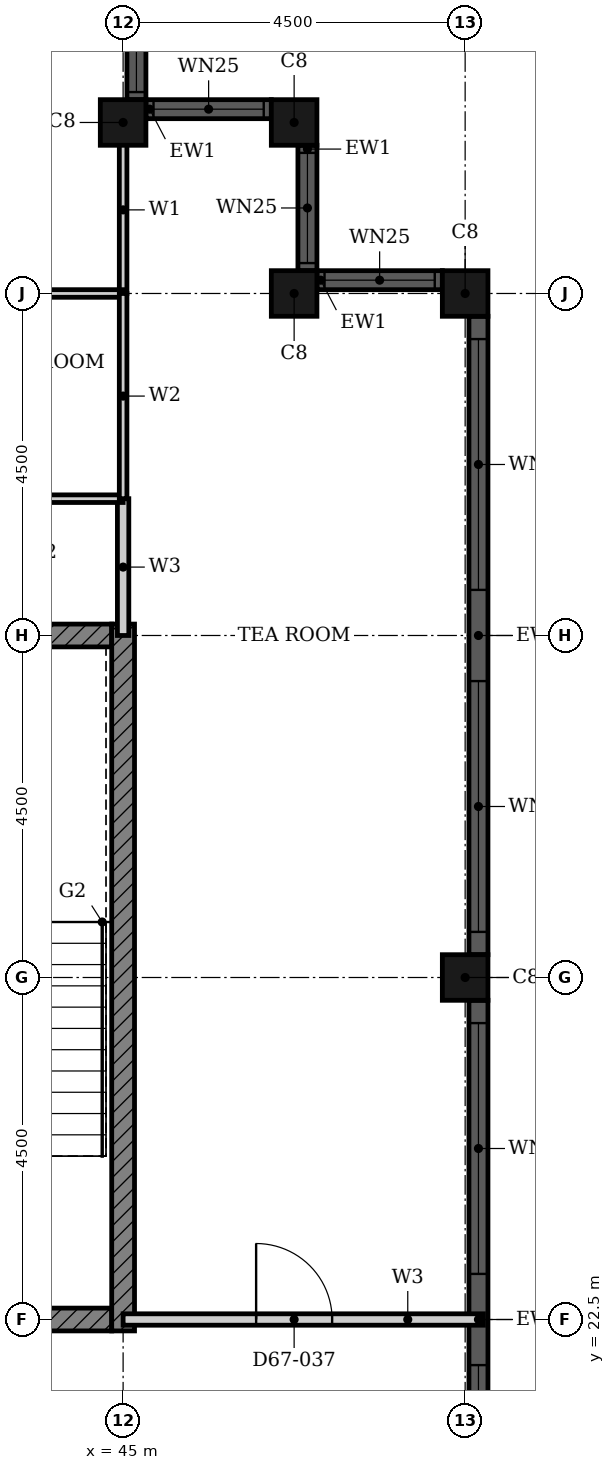
"""IFC4 building model, lengths in metres.
Left out: names, types, materials, properties, quantities, classifications, styles, units other than length and angle.
Written with IfcOpenShell. Run it as: python <this file> out.ifc"""

import sys

from ifc_helpers import new_model, si_unit, direction, frame, frame_2d, origin, origin_2d, place, context, subcontext, project, spatial, rectangle, hollow_rectangle, extrude, element, fill, save


model = new_model("IFC4")
c1 = context("Model", 3, precision=1e-05, world=origin(), true_north=direction((0.0, 1.0)))
c2 = subcontext(c1, "Body", "Model", "MODEL_VIEW")
j1 = project(units=[si_unit("LENGTHUNIT", "METRE"), si_unit("PLANEANGLEUNIT", "RADIAN")], contexts=[c1])
p1 = place(None, origin())
s1 = spatial("IfcSite", under=j1, at=p1, CompositionType="ELEMENT")
p2 = place(p1, origin())
s2 = spatial("IfcBuilding", under=s1, at=p2, CompositionType="ELEMENT")
p3 = place(p2, frame((0.0, 0.0, 263.8)))
s3 = spatial("IfcBuildingStorey", under=s2, at=p3, CompositionType="ELEMENT", Elevation=263.8)
for number, where, z_axis, x_axis in (
    (1, (49.5, 27.0, 0.0), (0.0, 0.0, 1.0), (1.0, 0.0, 0.0)),
    (2, (49.5, 36.0, 0.0), (0.0, 0.0, 1.0), (1.0, 0.0, 0.0)),
    (3, (47.25, 36.0, 0.0), (0.0, 0.0, 1.0), (1.0, 0.0, 0.0)),
    (4, (47.25, 38.25, 0.0), (0.0, 0.0, 1.0), (1.0, 0.0, 0.0)),
    (5, (45.0, 38.25, 0.0), (0.0, 0.0, 1.0), (1.0, 0.0, 0.0)),
):
    element("IfcColumn", number, at=place(p3, frame(where, z_axis=z_axis, x_axis=x_axis)), inside=s3, PredefinedType="COLUMN", context=c2, shape_type="SweptSolid", body=[
        extrude(hollow_rectangle(XDim=0.6, YDim=0.6, WallThickness=0.02, at=origin_2d()), origin(), (0.0, 0.0, 1.0), 3.7),
    ])
p4 = place(p3, frame((49.675, 18.3, 0.0), z_axis=(0.0, 0.0, 1.0), x_axis=(0.0, 1.0, 0.0)))
e6 = element("IfcWall", 6, at=p4, inside=s3, PredefinedType="SOLIDWALL", context=c2, shape_type="SweptSolid", body=[
    extrude(rectangle(XDim=8.4, YDim=0.25, at=frame_2d((4.2, 0.0))), origin(), (0.0, 0.0, 1.0), 3.7),
])
p5 = place(p4, frame((0.3, 0.0, 0.45)))
e7 = element("IfcOpeningElement", 7, at=p5, cuts=e6, PredefinedType="OPENING", context=c2, shape_type="SweptSolid", body=[
    extrude(rectangle(XDim=3.3, YDim=2.3, at=frame_2d((1.65, 1.15))), frame((0.0, 0.135, 0.0), z_axis=(0.0, -1.0, 0.0), x_axis=(1.0, 0.0, 0.0)), (0.0, 0.0, 1.0), 0.27),
])
p6 = place(p4, frame((4.8, 0.0, 0.45)))
e8 = element("IfcOpeningElement", 8, at=p6, cuts=e6, PredefinedType="OPENING", context=c2, shape_type="SweptSolid", body=[
    extrude(rectangle(XDim=3.3, YDim=2.3, at=frame_2d((1.65, 1.15))), frame((0.0, 0.135, 0.0), z_axis=(0.0, -1.0, 0.0), x_axis=(1.0, 0.0, 0.0)), (0.0, 0.0, 1.0), 0.27),
])
p7 = place(p3, frame((49.675, 27.3, 0.0), z_axis=(0.0, 0.0, 1.0), x_axis=(0.0, 1.0, 0.0)))
e9 = element("IfcWall", 9, at=p7, inside=s3, PredefinedType="SOLIDWALL", context=c2, shape_type="SweptSolid", body=[
    extrude(rectangle(XDim=8.4, YDim=0.25, at=frame_2d((4.2, 0.0))), origin(), (0.0, 0.0, 1.0), 3.7),
])
p8 = place(p7, frame((0.3, 0.0, 0.45)))
e10 = element("IfcOpeningElement", 10, at=p8, cuts=e9, PredefinedType="OPENING", context=c2, shape_type="SweptSolid", body=[
    extrude(rectangle(XDim=3.3, YDim=2.3, at=frame_2d((1.65, 1.15))), frame((0.0, 0.135, 0.0), z_axis=(0.0, -1.0, 0.0), x_axis=(1.0, 0.0, 0.0)), (0.0, 0.0, 1.0), 0.27),
])
p9 = place(p7, frame((4.8, 0.0, 0.45)))
e11 = element("IfcOpeningElement", 11, at=p9, cuts=e9, PredefinedType="OPENING", context=c2, shape_type="SweptSolid", body=[
    extrude(rectangle(XDim=3.3, YDim=2.3, at=frame_2d((1.65, 1.15))), frame((0.0, 0.135, 0.0), z_axis=(0.0, -1.0, 0.0), x_axis=(1.0, 0.0, 0.0)), (0.0, 0.0, 1.0), 0.27),
])
p10 = place(p3, frame((49.2, 36.175, 0.0), z_axis=(0.0, 0.0, 1.0), x_axis=(-1.0, 0.0, 0.0)))
e12 = element("IfcWall", 12, at=p10, inside=s3, PredefinedType="SOLIDWALL", context=c2, shape_type="SweptSolid", body=[
    extrude(rectangle(XDim=1.65, YDim=0.25, at=frame_2d((0.825, 0.0))), origin(), (0.0, 0.0, 1.0), 3.7),
])
p11 = place(p10, frame((0.1, 0.0, 0.9)))
e13 = element("IfcOpeningElement", 13, at=p11, cuts=e12, PredefinedType="OPENING", context=c2, shape_type="SweptSolid", body=[
    extrude(rectangle(XDim=1.45, YDim=1.85, at=frame_2d((0.725, 0.925))), frame((0.0, 0.135, 0.0), z_axis=(0.0, -1.0, 0.0), x_axis=(1.0, 0.0, 0.0)), (0.0, 0.0, 1.0), 0.27),
])
p12 = place(p3, frame((47.425, 36.3, 0.0), z_axis=(0.0, 0.0, 1.0), x_axis=(0.0, 1.0, 0.0)))
e14 = element("IfcWall", 14, at=p12, inside=s3, PredefinedType="SOLIDWALL", context=c2, shape_type="SweptSolid", body=[
    extrude(rectangle(XDim=1.65, YDim=0.25, at=frame_2d((0.825, 0.0))), origin(), (0.0, 0.0, 1.0), 3.7),
])
p13 = place(p12, frame((0.1, 0.0, 0.9)))
e15 = element("IfcOpeningElement", 15, at=p13, cuts=e14, PredefinedType="OPENING", context=c2, shape_type="SweptSolid", body=[
    extrude(rectangle(XDim=1.45, YDim=1.85, at=frame_2d((0.725, 0.925))), frame((0.0, 0.135, 0.0), z_axis=(0.0, -1.0, 0.0), x_axis=(1.0, 0.0, 0.0)), (0.0, 0.0, 1.0), 0.27),
])
p14 = place(p3, frame((46.95, 38.425, 0.0), z_axis=(0.0, 0.0, 1.0), x_axis=(-1.0, 0.0, 0.0)))
e16 = element("IfcWall", 16, at=p14, inside=s3, PredefinedType="SOLIDWALL", context=c2, shape_type="SweptSolid", body=[
    extrude(rectangle(XDim=1.65, YDim=0.25, at=frame_2d((0.825, 0.0))), origin(), (0.0, 0.0, 1.0), 3.7),
])
p15 = place(p14, frame((0.1, 0.0, 0.9)))
e17 = element("IfcOpeningElement", 17, at=p15, cuts=e16, PredefinedType="OPENING", context=c2, shape_type="SweptSolid", body=[
    extrude(rectangle(XDim=1.45, YDim=1.85, at=frame_2d((0.725, 0.925))), frame((0.0, 0.135, 0.0), z_axis=(0.0, -1.0, 0.0), x_axis=(1.0, 0.0, 0.0)), (0.0, 0.0, 1.0), 0.27),
])
p16 = place(p3, frame((45.175, 38.55, 0.0), z_axis=(0.0, 0.0, 1.0), x_axis=(0.0, 1.0, 0.0)))
e18 = element("IfcWall", 18, at=p16, inside=s3, PredefinedType="SOLIDWALL", context=c2, shape_type="SweptSolid", body=[
    extrude(rectangle(XDim=1.65, YDim=0.25, at=frame_2d((0.825, 0.0))), origin(), (0.0, 0.0, 1.0), 3.7),
])
p17 = place(p16, frame((0.1, 0.0, 0.9)))
e19 = element("IfcOpeningElement", 19, at=p17, cuts=e18, PredefinedType="OPENING", context=c2, shape_type="SweptSolid", body=[
    extrude(rectangle(XDim=1.45, YDim=1.85, at=frame_2d((0.725, 0.925))), frame((0.0, 0.135, 0.0), z_axis=(0.0, -1.0, 0.0), x_axis=(1.0, 0.0, 0.0)), (0.0, 0.0, 1.0), 0.27),
])
p18 = place(p3, frame((30.339, 22.5, 0.0), z_axis=(0.0, 0.0, 1.0), x_axis=(1.0, 0.0, 0.0)))
e20 = element("IfcWall", 20, at=p18, inside=s3, PredefinedType="SHEAR", context=c2, shape_type="SweptSolid", body=[
    extrude(rectangle(XDim=14.511, YDim=0.3, at=frame_2d((7.255, 0.0))), origin(), (0.0, 0.0, 1.0), 3.4),
])
p19 = place(p18, frame((7.975, 0.0, 0.0)))
e21 = element("IfcOpeningElement", 21, at=p19, cuts=e20, PredefinedType="OPENING", context=c2, shape_type="SweptSolid", body=[
    extrude(rectangle(XDim=1.8, YDim=2.1, at=frame_2d((0.9, 1.05))), frame((0.0, 0.16, 0.0), z_axis=(0.0, -1.0, 0.0), x_axis=(1.0, 0.0, 0.0)), (0.0, 0.0, 1.0), 0.32),
])
p20 = place(p3, frame((40.625, 31.5, 0.0), z_axis=(0.0, 0.0, 1.0), x_axis=(1.0, 0.0, 0.0)))
e22 = element("IfcWall", 22, at=p20, inside=s3, PredefinedType="SHEAR", context=c2, shape_type="SweptSolid", body=[
    extrude(rectangle(XDim=4.225, YDim=0.3, at=frame_2d((2.113, 0.0))), origin(), (0.0, 0.0, 1.0), 3.4),
])
p21 = place(p3, frame((45.0, 22.35, 0.0), z_axis=(0.0, 0.0, 1.0), x_axis=(0.0, 1.0, 0.0)))
e23 = element("IfcWall", 23, at=p21, inside=s3, PredefinedType="SHEAR", context=c2, shape_type="SweptSolid", body=[
    extrude(rectangle(XDim=9.3, YDim=0.3, at=frame_2d((4.65, 0.0))), origin(), (0.0, 0.0, 1.0), 3.4),
])
p22 = place(p3, frame((45.0, 22.5, 0.0), z_axis=(0.0, 0.0, 1.0), x_axis=(1.0, 0.0, 0.0)))
e24 = element("IfcWall", 24, at=p22, inside=s3, PredefinedType="PARTITIONING", context=c2, shape_type="SweptSolid", body=[
    extrude(rectangle(XDim=4.74, YDim=0.15, at=frame_2d((2.37, 0.0))), origin(), (0.0, 0.0, 1.0), 3.4),
])
p23 = place(p22, frame((1.75, 0.0, 0.0)))
e25 = element("IfcOpeningElement", 25, at=p23, cuts=e24, PredefinedType="OPENING", context=c2, shape_type="SweptSolid", body=[
    extrude(rectangle(XDim=1.0, YDim=2.1, at=frame_2d((0.5, 1.05))), frame((0.0, 0.085, 0.0), z_axis=(0.0, -1.0, 0.0), x_axis=(1.0, 0.0, 0.0)), (0.0, 0.0, 1.0), 0.17),
])
p24 = place(p3, frame((45.0, 31.5, 0.0), z_axis=(0.0, 0.0, 1.0), x_axis=(0.0, 1.0, 0.0)))
e26 = element("IfcWall", 26, at=p24, inside=s3, PredefinedType="PARTITIONING", context=c2, shape_type="SweptSolid", body=[
    extrude(rectangle(XDim=1.8, YDim=0.15, at=frame_2d((0.9, 0.0))), origin(), (0.0, 0.0, 1.0), 3.4),
])
p25 = place(p3, frame((45.0, 36.0, 0.0), z_axis=(0.0, 0.0, 1.0), x_axis=(0.0, 1.0, 0.0)))
e27 = element("IfcWall", 27, at=p25, inside=s3, PredefinedType="PARTITIONING", context=c2, shape_type="SweptSolid", body=[
    extrude(rectangle(XDim=2.2, YDim=0.1, at=frame_2d((1.1, 0.0))), origin(), (0.0, 0.0, 1.0), 3.4),
])
for number, where, z_axis, x_axis in (
    (28, (42.6, 33.3, 0.0), (0.0, 0.0, 1.0), (1.0, 0.0, 0.0)),
    (29, (42.6, 36.0, 0.0), (0.0, 0.0, 1.0), (1.0, 0.0, 0.0)),
):
    element("IfcWall", number, at=place(p3, frame(where, z_axis=z_axis, x_axis=x_axis)), inside=s3, PredefinedType="PARTITIONING", context=c2, shape_type="SweptSolid", body=[
        extrude(rectangle(XDim=2.4, YDim=0.1, at=frame_2d((1.2, 0.0))), origin(), (0.0, 0.0, 1.0), 3.4),
    ])
p26 = place(p3, frame((45.0, 33.3, 0.0), z_axis=(0.0, 0.0, 1.0), x_axis=(0.0, 1.0, 0.0)))
e30 = element("IfcWall", 30, at=p26, inside=s3, PredefinedType="PARTITIONING", context=c2, shape_type="SweptSolid", body=[
    extrude(rectangle(XDim=2.7, YDim=0.1, at=frame_2d((1.35, 0.0))), origin(), (0.0, 0.0, 1.0), 3.4),
])
p27 = place(p5, origin())
e31 = element("IfcWindow", 31, at=p27, inside=s3, PartitioningType="SINGLE_PANEL", PredefinedType="WINDOW", context=c2, shape_type="SweptSolid", body=[
    extrude(rectangle(XDim=3.3, YDim=2.3, at=frame_2d((1.65, 1.15))), frame((0.0, 0.03, 0.0), z_axis=(0.0, -1.0, 0.0), x_axis=(1.0, 0.0, 0.0)), (0.0, 0.0, 1.0), 0.06),
])
fill(e7, e31)
p28 = place(p6, origin())
e32 = element("IfcWindow", 32, at=p28, inside=s3, PartitioningType="SINGLE_PANEL", PredefinedType="WINDOW", context=c2, shape_type="SweptSolid", body=[
    extrude(rectangle(XDim=3.3, YDim=2.3, at=frame_2d((1.65, 1.15))), frame((0.0, 0.03, 0.0), z_axis=(0.0, -1.0, 0.0), x_axis=(1.0, 0.0, 0.0)), (0.0, 0.0, 1.0), 0.06),
])
fill(e8, e32)
p29 = place(p8, origin())
e33 = element("IfcWindow", 33, at=p29, inside=s3, PartitioningType="SINGLE_PANEL", PredefinedType="WINDOW", context=c2, shape_type="SweptSolid", body=[
    extrude(rectangle(XDim=3.3, YDim=2.3, at=frame_2d((1.65, 1.15))), frame((0.0, 0.03, 0.0), z_axis=(0.0, -1.0, 0.0), x_axis=(1.0, 0.0, 0.0)), (0.0, 0.0, 1.0), 0.06),
])
fill(e10, e33)
p30 = place(p9, origin())
e34 = element("IfcWindow", 34, at=p30, inside=s3, PartitioningType="SINGLE_PANEL", PredefinedType="WINDOW", context=c2, shape_type="SweptSolid", body=[
    extrude(rectangle(XDim=3.3, YDim=2.3, at=frame_2d((1.65, 1.15))), frame((0.0, 0.03, 0.0), z_axis=(0.0, -1.0, 0.0), x_axis=(1.0, 0.0, 0.0)), (0.0, 0.0, 1.0), 0.06),
])
fill(e11, e34)
p31 = place(p11, origin())
e35 = element("IfcWindow", 35, at=p31, inside=s3, PartitioningType="SINGLE_PANEL", PredefinedType="WINDOW", context=c2, shape_type="SweptSolid", body=[
    extrude(rectangle(XDim=1.45, YDim=1.85, at=frame_2d((0.725, 0.925))), frame((0.0, 0.03, 0.0), z_axis=(0.0, -1.0, 0.0), x_axis=(1.0, 0.0, 0.0)), (0.0, 0.0, 1.0), 0.06),
])
fill(e13, e35)
p32 = place(p13, origin())
e36 = element("IfcWindow", 36, at=p32, inside=s3, PartitioningType="SINGLE_PANEL", PredefinedType="WINDOW", context=c2, shape_type="SweptSolid", body=[
    extrude(rectangle(XDim=1.45, YDim=1.85, at=frame_2d((0.725, 0.925))), frame((0.0, 0.03, 0.0), z_axis=(0.0, -1.0, 0.0), x_axis=(1.0, 0.0, 0.0)), (0.0, 0.0, 1.0), 0.06),
])
fill(e15, e36)
p33 = place(p15, origin())
e37 = element("IfcWindow", 37, at=p33, inside=s3, PartitioningType="SINGLE_PANEL", PredefinedType="WINDOW", context=c2, shape_type="SweptSolid", body=[
    extrude(rectangle(XDim=1.45, YDim=1.85, at=frame_2d((0.725, 0.925))), frame((0.0, 0.03, 0.0), z_axis=(0.0, -1.0, 0.0), x_axis=(1.0, 0.0, 0.0)), (0.0, 0.0, 1.0), 0.06),
])
fill(e17, e37)
p34 = place(p17, origin())
e38 = element("IfcWindow", 38, at=p34, inside=s3, PartitioningType="SINGLE_PANEL", PredefinedType="WINDOW", context=c2, shape_type="SweptSolid", body=[
    extrude(rectangle(XDim=1.45, YDim=1.85, at=frame_2d((0.725, 0.925))), frame((0.0, 0.03, 0.0), z_axis=(0.0, -1.0, 0.0), x_axis=(1.0, 0.0, 0.0)), (0.0, 0.0, 1.0), 0.06),
])
fill(e19, e38)
p35 = place(p23, origin())
e39 = element("IfcDoor", 39, at=p35, inside=s3, OperationType="SINGLE_SWING_RIGHT", PredefinedType="DOOR", context=c2, shape_type="SweptSolid", body=[
    extrude(rectangle(XDim=1.0, YDim=2.1, at=frame_2d((0.5, 1.05))), frame((0.0, 0.025, 0.0), z_axis=(0.0, -1.0, 0.0), x_axis=(1.0, 0.0, 0.0)), (0.0, 0.0, 1.0), 0.05),
])
fill(e25, e39)
save(model, sys.argv[1])
